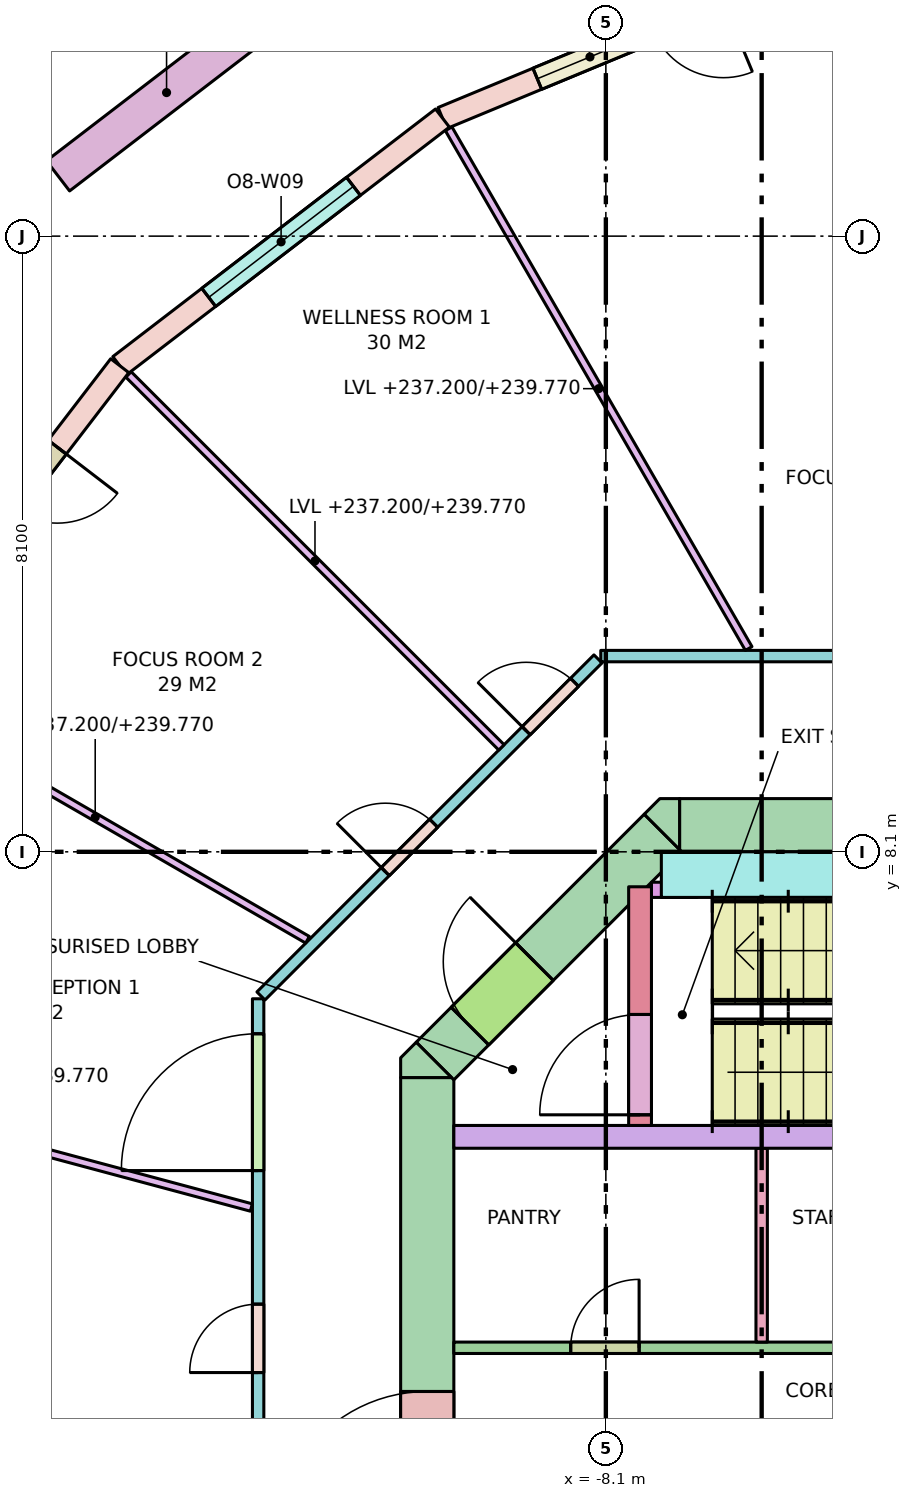
"""IFC4 building model, lengths in metres.
Left out: names, types, materials, properties, quantities, classifications, styles, units other than length and angle.
Written with IfcOpenShell. Run it as: python <this file> out.ifc"""

import sys

from ifc_helpers import new_model, si_unit, direction, frame, frame_2d, origin, place, context, subcontext, project, spatial, polyline, rectangle, outline, extrude, element, fill, save


model = new_model("IFC4")
c1 = context("Model", 3, precision=1e-05, world=origin(), true_north=direction((0.0, 1.0)))
c2 = subcontext(c1, "Body", "Model", "MODEL_VIEW")
j1 = project(units=[si_unit("LENGTHUNIT", "METRE"), si_unit("PLANEANGLEUNIT", "RADIAN")], contexts=[c1])
p1 = place(None, origin())
s1 = spatial("IfcSite", under=j1, at=p1, CompositionType="ELEMENT")
p2 = place(p1, origin())
s2 = spatial("IfcBuilding", under=s1, at=p2, CompositionType="ELEMENT")
p3 = place(p2, frame((0.0, 0.0, 237.2)))
s3 = spatial("IfcBuildingStorey", under=s2, at=p3, CompositionType="ELEMENT", Elevation=237.2)
p4 = place(p3, frame((-7.13, 8.45, -0.28), z_axis=(0.0, 0.0, 1.0), x_axis=(1.0, 0.0, 0.0)))
e1 = element("IfcWall", 1, at=p4, inside=s3, PredefinedType="SHEAR", context=c2, shape_type="SweptSolid", body=[
    extrude(rectangle(XDim=14.26, YDim=0.7, at=frame_2d((7.13, 0.0))), origin(), (0.0, 0.0, 1.0), 3.7),
])
p5 = place(p4, frame((5.48, 0.0, 0.28)))
e2 = element("IfcOpeningElement", 2, at=p5, cuts=e1, PredefinedType="OPENING", context=c2, shape_type="SweptSolid", body=[
    extrude(rectangle(XDim=0.7, YDim=2.1, at=frame_2d((0.35, 1.05))), frame((0.0, 0.36, 0.0), z_axis=(0.0, -1.0, 0.0), x_axis=(1.0, 0.0, 0.0)), (0.0, 0.0, 1.0), 0.72),
])
p6 = place(p4, frame((7.155, 0.0, 0.28)))
e3 = element("IfcOpeningElement", 3, at=p6, cuts=e1, PredefinedType="OPENING", context=c2, shape_type="SweptSolid", body=[
    extrude(rectangle(XDim=0.9, YDim=2.1, at=frame_2d((0.45, 1.05))), frame((0.0, 0.36, 0.0), z_axis=(0.0, -1.0, 0.0), x_axis=(1.0, 0.0, 0.0)), (0.0, 0.0, 1.0), 0.72),
])
p7 = place(p3, frame((-10.45, -5.13, -0.28), z_axis=(0.0, 0.0, 1.0), x_axis=(0.0, 1.0, 0.0)))
e4 = element("IfcWall", 4, at=p7, inside=s3, PredefinedType="SHEAR", context=c2, shape_type="SweptSolid", body=[
    extrude(rectangle(XDim=10.26, YDim=0.7, at=frame_2d((5.13, 0.0))), origin(), (0.0, 0.0, 1.0), 3.7),
])
p8 = place(p7, frame((4.13, 0.0, 0.28)))
e5 = element("IfcOpeningElement", 5, at=p8, cuts=e4, PredefinedType="OPENING", context=c2, shape_type="SweptSolid", body=[
    extrude(rectangle(XDim=2.0, YDim=2.1, at=frame_2d((1.0, 1.05))), frame((0.0, 0.36, 0.0), z_axis=(0.0, -1.0, 0.0), x_axis=(1.0, 0.0, 0.0)), (0.0, 0.0, 1.0), 0.72),
])
p9 = place(p3, frame((-10.347, 5.347, -0.28), z_axis=(0.0, 0.0, 1.0), x_axis=(0.707106781187, 0.707106781187, 0.0)))
e6 = element("IfcWall", 6, at=p9, inside=s3, PredefinedType="SHEAR", context=c2, shape_type="SweptSolid", body=[
    extrude(rectangle(XDim=4.243, YDim=0.7, at=frame_2d((2.121, 0.0))), origin(), (0.0, 0.0, 1.0), 3.7),
])
p10 = place(p9, frame((0.65, 0.0, 0.28)))
e7 = element("IfcOpeningElement", 7, at=p10, cuts=e6, PredefinedType="OPENING", context=c2, shape_type="SweptSolid", body=[
    extrude(rectangle(XDim=1.2, YDim=2.1, at=frame_2d((0.6, 1.05))), frame((0.0, 0.36, 0.0), z_axis=(0.0, -1.0, 0.0), x_axis=(1.0, 0.0, 0.0)), (0.0, 0.0, 1.0), 0.72),
])
p11 = place(p3, frame((0.0, 0.0, -0.28)))
e8 = element("IfcWall", 8, at=p11, inside=s3, PredefinedType="SHEAR", context=c2, shape_type="SweptSolid", body=[
    extrude(outline(polyline([(-10.595, 5.595), (-10.595, 5.595), (-10.595, 5.595), (-10.13, 5.13), (-10.8, 5.13), (-10.8, 5.13), (-10.8, 5.39), (-10.595, 5.595)])), origin(), (0.0, 0.0, 1.0), 3.7),
])
p12 = place(p3, frame((0.0, 0.0, -0.28)))
e9 = element("IfcWall", 9, at=p12, inside=s3, PredefinedType="SHEAR", context=c2, shape_type="SweptSolid", body=[
    extrude(outline(polyline([(-7.39, 8.8), (-7.13, 8.8), (-7.13, 8.8), (-7.13, 8.13), (-7.595, 8.595), (-7.595, 8.595), (-7.595, 8.595), (-7.39, 8.8)])), origin(), (0.0, 0.0, 1.0), 3.7),
])
p13 = place(p3, frame((-10.1, 4.35, 0.0), z_axis=(0.0, 0.0, 1.0), x_axis=(1.0, 0.0, 0.0)))
e10 = element("IfcWall", 10, at=p13, inside=s3, PredefinedType="SOLIDWALL", context=c2, shape_type="SweptSolid", body=[
    extrude(rectangle(XDim=8.1, YDim=0.3, at=frame_2d((4.05, 0.0))), origin(), (0.0, 0.0, 1.0), 3.42),
])
p14 = place(p3, frame((-7.65, 4.5, 0.0), z_axis=(0.0, 0.0, 1.0), x_axis=(0.0, 1.0, 0.0)))
e11 = element("IfcWall", 11, at=p14, inside=s3, PredefinedType="SHEAR", context=c2, shape_type="SweptSolid", body=[
    extrude(rectangle(XDim=3.14, YDim=0.3, at=frame_2d((1.57, 0.0))), origin(), (0.0, 0.0, 1.0), 3.42),
])
p15 = place(p14, frame((0.14, 0.0, 0.0)))
e12 = element("IfcOpeningElement", 12, at=p15, cuts=e11, PredefinedType="OPENING", context=c2, shape_type="SweptSolid", body=[
    extrude(rectangle(XDim=1.32, YDim=2.1, at=frame_2d((0.66, 1.05))), frame((0.0, 0.16, 0.0), z_axis=(0.0, -1.0, 0.0), x_axis=(1.0, 0.0, 0.0)), (0.0, 0.0, 1.0), 0.32),
])
p16 = place(p3, frame((-7.37, 7.8, 0.0), z_axis=(0.0, 0.0, 1.0), x_axis=(1.0, 0.0, 0.0)))
e13 = element("IfcWall", 13, at=p16, inside=s3, PredefinedType="SHEAR", context=c2, shape_type="SweptSolid", body=[
    extrude(rectangle(XDim=5.37, YDim=0.6, at=frame_2d((2.685, 0.0))), origin(), (0.0, 0.0, 1.0), 3.42),
])
p17 = place(p3, frame((-7.5, 7.6, 0.0), z_axis=(0.0, 0.0, 1.0), x_axis=(1.0, 0.0, 0.0)))
e14 = element("IfcWall", 14, at=p17, inside=s3, PredefinedType="SHEAR", context=c2, shape_type="SweptSolid", body=[
    extrude(rectangle(XDim=0.6, YDim=0.2, at=frame_2d((0.3, 0.0))), origin(), (0.0, 0.0, 1.0), 3.42),
])
p18 = place(p3, frame((-5.306, 19.802, 0.0), z_axis=(0.0, 0.0, 1.0), x_axis=(-0.923867255172, -0.382713071139, 0.0)))
e15 = element("IfcWall", 15, at=p18, inside=s3, PredefinedType="STANDARD", context=c2, shape_type="SweptSolid", body=[
    extrude(rectangle(XDim=5.352, YDim=0.3, at=frame_2d((2.676, 0.0))), origin(), (0.0, 0.0, 1.0), 3.42),
])
p19 = place(p18, frame((1.351, 0.0, 0.0)))
e16 = element("IfcOpeningElement", 16, at=p19, cuts=e15, PredefinedType="OPENING", context=c2, shape_type="SweptSolid", body=[
    extrude(rectangle(XDim=1.0, YDim=2.4, at=frame_2d((0.5, 1.2))), frame((0.0, 0.16, 0.0), z_axis=(0.0, -1.0, 0.0), x_axis=(1.0, 0.0, 0.0)), (0.0, 0.0, 1.0), 0.32),
])
p20 = place(p18, frame((2.501, 0.0, 0.8)))
e17 = element("IfcOpeningElement", 17, at=p20, cuts=e15, PredefinedType="OPENING", context=c2, shape_type="SweptSolid", body=[
    extrude(rectangle(XDim=1.5, YDim=2.4, at=frame_2d((0.75, 1.2))), frame((0.0, 0.16, 0.0), z_axis=(0.0, -1.0, 0.0), x_axis=(1.0, 0.0, 0.0)), (0.0, 0.0, 1.0), 0.32),
])
p21 = place(p3, frame((-10.25, 17.753, 0.0), z_axis=(0.0, 0.0, 1.0), x_axis=(-0.793349293227, -0.60876670321, 0.0)))
e18 = element("IfcWall", 18, at=p21, inside=s3, PredefinedType="STANDARD", context=c2, shape_type="SweptSolid", body=[
    extrude(rectangle(XDim=5.352, YDim=0.3, at=frame_2d((2.676, 0.0))), origin(), (0.0, 0.0, 1.0), 3.42),
])
p22 = place(p21, frame((1.476, 0.0, 0.8)))
e19 = element("IfcOpeningElement", 19, at=p22, cuts=e18, PredefinedType="OPENING", context=c2, shape_type="SweptSolid", body=[
    extrude(rectangle(XDim=2.4, YDim=2.4, at=frame_2d((1.2, 1.2))), frame((0.0, 0.16, 0.0), z_axis=(0.0, -1.0, 0.0), x_axis=(1.0, 0.0, 0.0)), (0.0, 0.0, 1.0), 0.32),
])
p23 = place(p3, frame((-14.496, 14.496, 0.0), z_axis=(0.0, 0.0, 1.0), x_axis=(-0.60876670321, -0.793349293227, 0.0)))
e20 = element("IfcWall", 20, at=p23, inside=s3, PredefinedType="STANDARD", context=c2, shape_type="SweptSolid", body=[
    extrude(rectangle(XDim=5.352, YDim=0.3, at=frame_2d((2.676, 0.0))), origin(), (0.0, 0.0, 1.0), 3.42),
])
p24 = place(p23, frame((1.351, 0.0, 0.0)))
e21 = element("IfcOpeningElement", 21, at=p24, cuts=e20, PredefinedType="OPENING", context=c2, shape_type="SweptSolid", body=[
    extrude(rectangle(XDim=1.0, YDim=2.4, at=frame_2d((0.5, 1.2))), frame((0.0, 0.16, 0.0), z_axis=(0.0, -1.0, 0.0), x_axis=(1.0, 0.0, 0.0)), (0.0, 0.0, 1.0), 0.32),
])
p25 = place(p23, frame((2.501, 0.0, 0.8)))
e22 = element("IfcOpeningElement", 22, at=p25, cuts=e20, PredefinedType="OPENING", context=c2, shape_type="SweptSolid", body=[
    extrude(rectangle(XDim=1.5, YDim=2.4, at=frame_2d((0.75, 1.2))), frame((0.0, 0.16, 0.0), z_axis=(0.0, -1.0, 0.0), x_axis=(1.0, 0.0, 0.0)), (0.0, 0.0, 1.0), 0.32),
])
p26 = place(p3, frame((-12.452, 19.184, 0.0), z_axis=(0.0, 0.0, 1.0), x_axis=(-0.793384730612, -0.608720518162, 0.0)))
e23 = element("IfcWall", 23, at=p26, inside=s3, PredefinedType="PARAPET", context=c2, shape_type="SweptSolid", body=[
    extrude(rectangle(XDim=3.6, YDim=0.5, at=frame_2d((1.8, 0.0))), origin(), (0.0, 0.0, 1.0), 0.9),
])
p27 = place(p3, frame((-6.05, 1.65, 0.0), z_axis=(0.0, 0.0, 1.0), x_axis=(0.0, 1.0, 0.0)))
e24 = element("IfcWall", 24, at=p27, inside=s3, PredefinedType="PARTITIONING", context=c2, shape_type="SweptSolid", body=[
    extrude(rectangle(XDim=2.55, YDim=0.15, at=frame_2d((1.275, 0.0))), origin(), (0.0, 0.0, 1.0), 3.42),
])
p28 = place(p3, frame((-10.1, 1.575, 0.0), z_axis=(0.0, 0.0, 1.0), x_axis=(1.0, 0.0, 0.0)))
e25 = element("IfcWall", 25, at=p28, inside=s3, PredefinedType="PARTITIONING", context=c2, shape_type="SweptSolid", body=[
    extrude(rectangle(XDim=8.1, YDim=0.15, at=frame_2d((4.05, 0.0))), origin(), (0.0, 0.0, 1.0), 3.42),
])
p29 = place(p28, frame((1.538, 0.0, 0.0)))
e26 = element("IfcOpeningElement", 26, at=p29, cuts=e25, PredefinedType="OPENING", context=c2, shape_type="SweptSolid", body=[
    extrude(rectangle(XDim=0.9, YDim=2.1, at=frame_2d((0.45, 1.05))), frame((0.0, 0.085, 0.0), z_axis=(0.0, -1.0, 0.0), x_axis=(1.0, 0.0, 0.0)), (0.0, 0.0, 1.0), 0.17),
])
p30 = place(p28, frame((5.663, 0.0, 0.0)))
e27 = element("IfcOpeningElement", 27, at=p30, cuts=e25, PredefinedType="OPENING", context=c2, shape_type="SweptSolid", body=[
    extrude(rectangle(XDim=0.9, YDim=2.1, at=frame_2d((0.45, 1.05))), frame((0.0, 0.085, 0.0), z_axis=(0.0, -1.0, 0.0), x_axis=(1.0, 0.0, 0.0)), (0.0, 0.0, 1.0), 0.17),
])
p31 = place(p3, frame((-12.675, -3.396, 0.0), z_axis=(0.0, 0.0, 1.0), x_axis=(0.0, 1.0, 0.0)))
e28 = element("IfcWall", 28, at=p31, inside=s3, PredefinedType="PARTITIONING", context=c2, shape_type="SweptSolid", body=[
    extrude(rectangle(XDim=9.563, YDim=0.15, at=frame_2d((4.781, 0.0))), origin(), (0.0, 0.0, 1.0), 2.57),
])
p32 = place(p31, frame((7.303, 0.0, 0.0)))
e29 = element("IfcOpeningElement", 29, at=p32, cuts=e28, PredefinedType="OPENING", context=c2, shape_type="SweptSolid", body=[
    extrude(rectangle(XDim=1.8, YDim=2.1, at=frame_2d((0.9, 1.05))), frame((0.0, 0.085, 0.0), z_axis=(0.0, -1.0, 0.0), x_axis=(1.0, 0.0, 0.0)), (0.0, 0.0, 1.0), 0.17),
])
p33 = place(p31, frame((4.645, 0.0, 0.0)))
e30 = element("IfcOpeningElement", 30, at=p33, cuts=e28, PredefinedType="OPENING", context=c2, shape_type="SweptSolid", body=[
    extrude(rectangle(XDim=0.9, YDim=2.1, at=frame_2d((0.45, 1.05))), frame((0.0, 0.085, 0.0), z_axis=(0.0, -1.0, 0.0), x_axis=(1.0, 0.0, 0.0)), (0.0, 0.0, 1.0), 0.17),
])
p34 = place(p31, frame((1.273, 0.0, 0.0)))
e31 = element("IfcOpeningElement", 31, at=p34, cuts=e28, PredefinedType="OPENING", context=c2, shape_type="SweptSolid", body=[
    extrude(rectangle(XDim=0.9, YDim=2.1, at=frame_2d((0.45, 1.05))), frame((0.0, 0.085, 0.0), z_axis=(0.0, -1.0, 0.0), x_axis=(1.0, 0.0, 0.0)), (0.0, 0.0, 1.0), 0.17),
])
p35 = place(p3, frame((-12.638, 6.204, 0.0), z_axis=(0.0, 0.0, 1.0), x_axis=(0.707106781187, 0.707106781187, 0.0)))
e32 = element("IfcWall", 32, at=p35, inside=s3, PredefinedType="PARTITIONING", context=c2, shape_type="SweptSolid", body=[
    extrude(rectangle(XDim=6.271, YDim=0.15, at=frame_2d((3.135, 0.0))), origin(), (0.0, 0.0, 1.0), 2.57),
])
p36 = place(p35, frame((4.935, 0.0, 0.0)))
e33 = element("IfcOpeningElement", 33, at=p36, cuts=e32, PredefinedType="OPENING", context=c2, shape_type="SweptSolid", body=[
    extrude(rectangle(XDim=0.9, YDim=2.1, at=frame_2d((0.45, 1.05))), frame((0.0, 0.085, 0.0), z_axis=(0.0, -1.0, 0.0), x_axis=(1.0, 0.0, 0.0)), (0.0, 0.0, 1.0), 0.17),
])
p37 = place(p35, frame((2.314, 0.0, 0.0)))
e34 = element("IfcOpeningElement", 34, at=p37, cuts=e32, PredefinedType="OPENING", context=c2, shape_type="SweptSolid", body=[
    extrude(rectangle(XDim=0.9, YDim=2.1, at=frame_2d((0.45, 1.05))), frame((0.0, 0.085, 0.0), z_axis=(0.0, -1.0, 0.0), x_axis=(1.0, 0.0, 0.0)), (0.0, 0.0, 1.0), 0.17),
])
p38 = place(p3, frame((-8.167, 10.675, 0.0), z_axis=(0.0, 0.0, 1.0), x_axis=(1.0, 0.0, 0.0)))
e35 = element("IfcWall", 35, at=p38, inside=s3, PredefinedType="PARTITIONING", context=c2, shape_type="SweptSolid", body=[
    extrude(rectangle(XDim=16.333, YDim=0.15, at=frame_2d((8.167, 0.0))), origin(), (0.0, 0.0, 1.0), 2.57),
])
p39 = place(p38, frame((12.232, 0.0, 0.0)))
e36 = element("IfcOpeningElement", 36, at=p39, cuts=e35, PredefinedType="OPENING", context=c2, shape_type="SweptSolid", body=[
    extrude(rectangle(XDim=0.9, YDim=2.1, at=frame_2d((0.45, 1.05))), frame((0.0, 0.085, 0.0), z_axis=(0.0, -1.0, 0.0), x_axis=(1.0, 0.0, 0.0)), (0.0, 0.0, 1.0), 0.17),
])
p40 = place(p38, frame((7.667, 0.0, 0.0)))
e37 = element("IfcOpeningElement", 37, at=p40, cuts=e35, PredefinedType="OPENING", context=c2, shape_type="SweptSolid", body=[
    extrude(rectangle(XDim=1.0, YDim=2.1, at=frame_2d((0.5, 1.05))), frame((0.0, 0.085, 0.0), z_axis=(0.0, -1.0, 0.0), x_axis=(1.0, 0.0, 0.0)), (0.0, 0.0, 1.0), 0.17),
])
p41 = place(p38, frame((3.201, 0.0, 0.0)))
e38 = element("IfcOpeningElement", 38, at=p41, cuts=e35, PredefinedType="OPENING", context=c2, shape_type="SweptSolid", body=[
    extrude(rectangle(XDim=0.9, YDim=2.1, at=frame_2d((0.45, 1.05))), frame((0.0, 0.085, 0.0), z_axis=(0.0, -1.0, 0.0), x_axis=(1.0, 0.0, 0.0)), (0.0, 0.0, 1.0), 0.17),
])
p42 = place(p3, frame((-2.884, 10.764, 0.0), z_axis=(0.0, 0.0, 1.0), x_axis=(-0.258811310764, 0.965927898666, 0.0)))
e39 = element("IfcWall", 39, at=p42, inside=s3, PredefinedType="PARTITIONING", context=c2, shape_type="SweptSolid", body=[
    extrude(rectangle(XDim=9.193, YDim=0.1, at=frame_2d((4.596, 0.0))), origin(), (0.0, 0.0, 1.0), 2.57),
])
p43 = place(p3, frame((-6.221, 10.775, 0.0), z_axis=(0.0, 0.0, 1.0), x_axis=(-0.500016891966, 0.866015650984, 0.0)))
e40 = element("IfcWall", 40, at=p43, inside=s3, PredefinedType="PARTITIONING", context=c2, shape_type="SweptSolid", body=[
    extrude(rectangle(XDim=7.895, YDim=0.1, at=frame_2d((3.948, 0.0))), origin(), (0.0, 0.0, 1.0), 2.57),
])
p44 = place(p3, frame((-9.474, 9.474, 0.0), z_axis=(0.0, 0.0, 1.0), x_axis=(-0.707106781187, 0.707106781187, 0.0)))
e41 = element("IfcWall", 41, at=p44, inside=s3, PredefinedType="PARTITIONING", context=c2, shape_type="SweptSolid", body=[
    extrude(rectangle(XDim=6.938, YDim=0.1, at=frame_2d((3.469, 0.0))), origin(), (0.0, 0.0, 1.0), 2.57),
])
p45 = place(p3, frame((-12.025, 6.943, 0.0), z_axis=(0.0, 0.0, 1.0), x_axis=(-0.866026773083, 0.499997628298, 0.0)))
e42 = element("IfcWall", 42, at=p45, inside=s3, PredefinedType="PARTITIONING", context=c2, shape_type="SweptSolid", body=[
    extrude(rectangle(XDim=6.451, YDim=0.1, at=frame_2d((3.226, 0.0))), origin(), (0.0, 0.0, 1.0), 2.57),
])
p46 = place(p3, frame((-12.764, 3.42, 0.0), z_axis=(0.0, 0.0, 1.0), x_axis=(-0.965928160208, 0.258810334643, 0.0)))
e43 = element("IfcWall", 43, at=p46, inside=s3, PredefinedType="PARTITIONING", context=c2, shape_type="SweptSolid", body=[
    extrude(rectangle(XDim=7.122, YDim=0.1, at=frame_2d((3.561, 0.0))), origin(), (0.0, 0.0, 1.0), 2.57),
])
p47 = place(p20, origin())
e44 = element("IfcWindow", 44, at=p47, inside=s3, PartitioningType="SINGLE_PANEL", PredefinedType="WINDOW", context=c2, shape_type="SweptSolid", body=[
    extrude(rectangle(XDim=1.5, YDim=2.4, at=frame_2d((0.75, 1.2))), frame((0.0, 0.03, 0.0), z_axis=(0.0, -1.0, 0.0), x_axis=(1.0, 0.0, 0.0)), (0.0, 0.0, 1.0), 0.06),
])
fill(e17, e44)
p48 = place(p22, origin())
e45 = element("IfcWindow", 45, at=p48, inside=s3, PartitioningType="SINGLE_PANEL", PredefinedType="WINDOW", context=c2, shape_type="SweptSolid", body=[
    extrude(rectangle(XDim=2.4, YDim=2.4, at=frame_2d((1.2, 1.2))), frame((0.0, 0.03, 0.0), z_axis=(0.0, -1.0, 0.0), x_axis=(1.0, 0.0, 0.0)), (0.0, 0.0, 1.0), 0.06),
])
fill(e19, e45)
p49 = place(p24, origin())
e46 = element("IfcDoor", 46, at=p49, inside=s3, OperationType="SINGLE_SWING_LEFT", PredefinedType="DOOR", context=c2, shape_type="SweptSolid", body=[
    extrude(rectangle(XDim=1.0, YDim=2.4, at=frame_2d((0.5, 1.2))), frame((0.0, 0.025, 0.0), z_axis=(0.0, -1.0, 0.0), x_axis=(1.0, 0.0, 0.0)), (0.0, 0.0, 1.0), 0.05),
])
fill(e21, e46)
p50 = place(p15, origin())
e47 = element("IfcDoor", 47, at=p50, inside=s3, OperationType="DOUBLE_DOOR_SINGLE_SWING", PredefinedType="DOOR", context=c2, shape_type="SweptSolid", body=[
    extrude(rectangle(XDim=1.32, YDim=2.1, at=frame_2d((0.66, 1.05))), frame((0.0, 0.025, 0.0), z_axis=(0.0, -1.0, 0.0), x_axis=(1.0, 0.0, 0.0)), (0.0, 0.0, 1.0), 0.05),
])
fill(e12, e47)
p51 = place(p10, origin())
e48 = element("IfcDoor", 48, at=p51, inside=s3, OperationType="SINGLE_SWING_RIGHT", PredefinedType="DOOR", context=c2, shape_type="SweptSolid", body=[
    extrude(rectangle(XDim=1.2, YDim=2.1, at=frame_2d((0.6, 1.05))), frame((0.0, 0.025, 0.0), z_axis=(0.0, -1.0, 0.0), x_axis=(1.0, 0.0, 0.0)), (0.0, 0.0, 1.0), 0.05),
])
fill(e7, e48)
p52 = place(p8, origin())
e49 = element("IfcDoor", 49, at=p52, inside=s3, OperationType="DOUBLE_DOOR_SINGLE_SWING", PredefinedType="DOOR", context=c2, shape_type="SweptSolid", body=[
    extrude(rectangle(XDim=2.0, YDim=2.1, at=frame_2d((1.0, 1.05))), frame((0.0, 0.025, 0.0), z_axis=(0.0, -1.0, 0.0), x_axis=(1.0, 0.0, 0.0)), (0.0, 0.0, 1.0), 0.05),
])
fill(e5, e49)
p53 = place(p29, origin())
e50 = element("IfcDoor", 50, at=p53, inside=s3, OperationType="SINGLE_SWING_RIGHT", PredefinedType="DOOR", context=c2, shape_type="SweptSolid", body=[
    extrude(rectangle(XDim=0.9, YDim=2.1, at=frame_2d((0.45, 1.05))), frame((0.0, 0.025, 0.0), z_axis=(0.0, -1.0, 0.0), x_axis=(1.0, 0.0, 0.0)), (0.0, 0.0, 1.0), 0.05),
])
fill(e26, e50)
p54 = place(p36, origin())
e51 = element("IfcDoor", 51, at=p54, inside=s3, OperationType="SINGLE_SWING_LEFT", PredefinedType="DOOR", context=c2, shape_type="SweptSolid", body=[
    extrude(rectangle(XDim=0.9, YDim=2.1, at=frame_2d((0.45, 1.05))), frame((0.0, 0.025, 0.0), z_axis=(0.0, -1.0, 0.0), x_axis=(1.0, 0.0, 0.0)), (0.0, 0.0, 1.0), 0.05),
])
fill(e33, e51)
p55 = place(p37, origin())
e52 = element("IfcDoor", 52, at=p55, inside=s3, OperationType="SINGLE_SWING_LEFT", PredefinedType="DOOR", context=c2, shape_type="SweptSolid", body=[
    extrude(rectangle(XDim=0.9, YDim=2.1, at=frame_2d((0.45, 1.05))), frame((0.0, 0.025, 0.0), z_axis=(0.0, -1.0, 0.0), x_axis=(1.0, 0.0, 0.0)), (0.0, 0.0, 1.0), 0.05),
])
fill(e34, e52)
p56 = place(p32, origin())
e53 = element("IfcDoor", 53, at=p56, inside=s3, OperationType="DOUBLE_DOOR_SINGLE_SWING", PredefinedType="DOOR", context=c2, shape_type="SweptSolid", body=[
    extrude(rectangle(XDim=1.8, YDim=2.1, at=frame_2d((0.9, 1.05))), frame((0.0, 0.025, 0.0), z_axis=(0.0, -1.0, 0.0), x_axis=(1.0, 0.0, 0.0)), (0.0, 0.0, 1.0), 0.05),
])
fill(e29, e53)
p57 = place(p33, origin())
e54 = element("IfcDoor", 54, at=p57, inside=s3, OperationType="SINGLE_SWING_LEFT", PredefinedType="DOOR", context=c2, shape_type="SweptSolid", body=[
    extrude(rectangle(XDim=0.9, YDim=2.1, at=frame_2d((0.45, 1.05))), frame((0.0, 0.025, 0.0), z_axis=(0.0, -1.0, 0.0), x_axis=(1.0, 0.0, 0.0)), (0.0, 0.0, 1.0), 0.05),
])
fill(e30, e54)
save(model, sys.argv[1])
